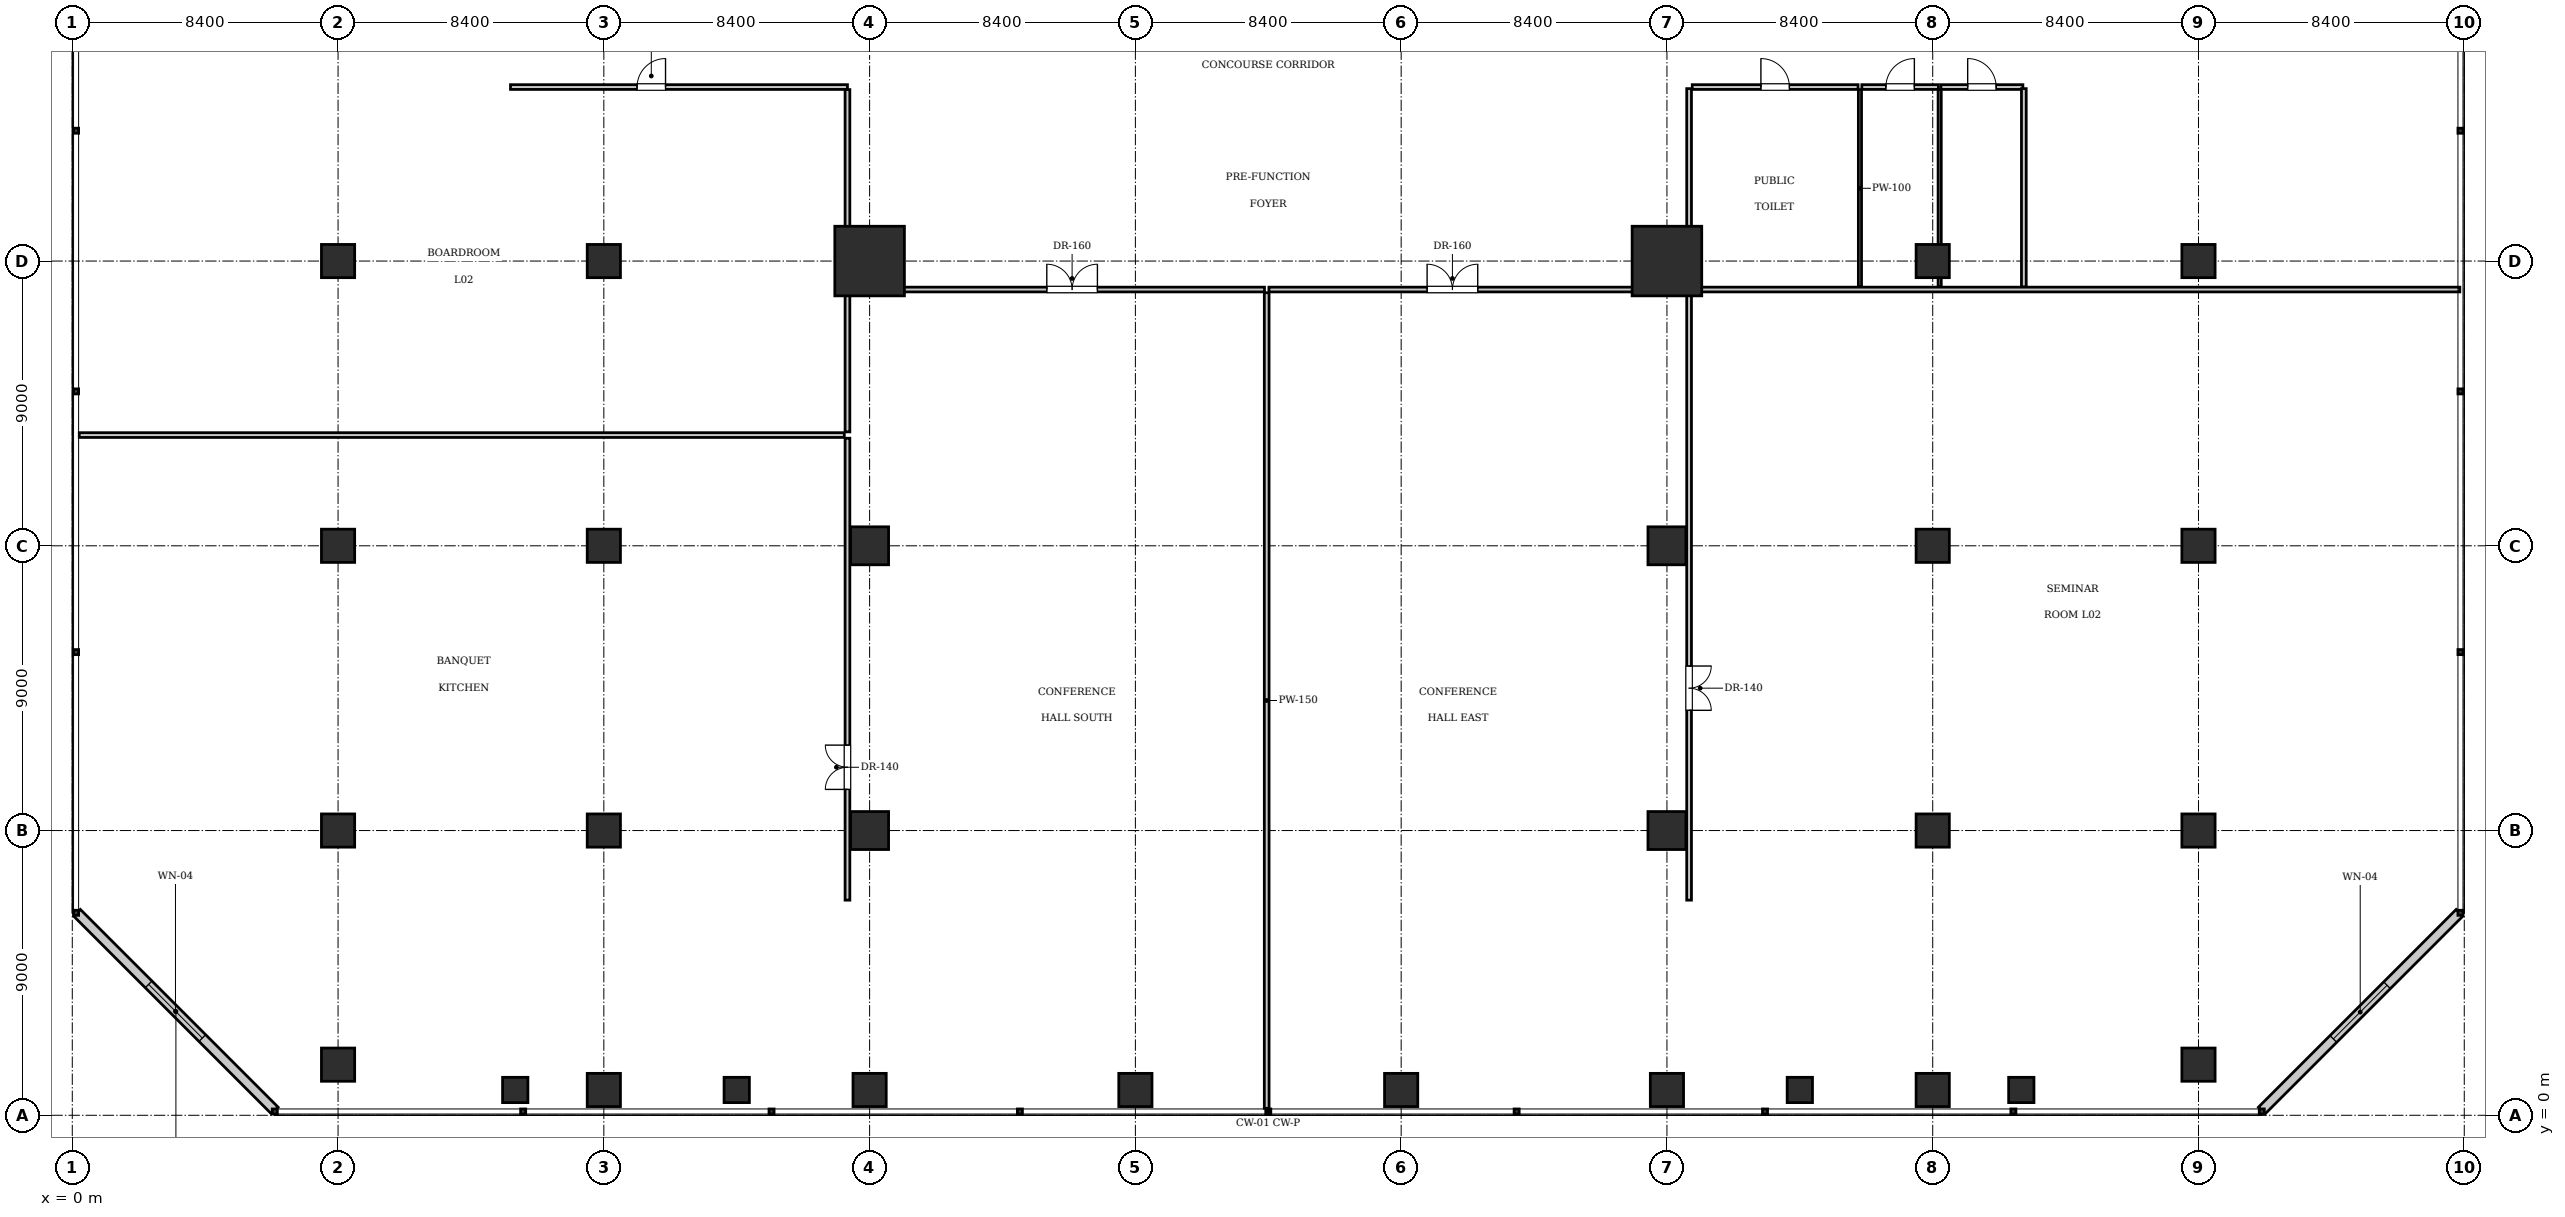
"""IFC4 building model, lengths in metres.
Left out: names, types, materials, properties, quantities, classifications, styles, units other than length and angle.
Written with IfcOpenShell. Run it as: python <this file> out.ifc"""

import sys

from ifc_helpers import new_model, si_unit, direction, frame, frame_2d, origin, origin_2d, place, context, subcontext, project, spatial, rectangle, extrude, element, fill, save


model = new_model("IFC4")
c1 = context("Model", 3, precision=1e-05, world=origin(), true_north=direction((0.0, 1.0)))
c2 = subcontext(c1, "Body", "Model", "MODEL_VIEW")
j1 = project(units=[si_unit("LENGTHUNIT", "METRE"), si_unit("PLANEANGLEUNIT", "RADIAN")], contexts=[c1])
p1 = place(None, origin())
s1 = spatial("IfcSite", under=j1, at=p1, CompositionType="ELEMENT")
p2 = place(p1, origin())
s2 = spatial("IfcBuilding", under=s1, at=p2, CompositionType="ELEMENT")
p3 = place(p2, frame((0.0, 0.0, 10.85)))
s3 = spatial("IfcBuildingStorey", under=s2, at=p3, CompositionType="ELEMENT", Elevation=10.85)
for number, where, z_axis, x_axis in (
    (1, (25.2, 27.0, 0.0), (0.0, 0.0, 1.0), (1.0, 0.0, 0.0)),
    (2, (50.4, 27.0, 0.0), (0.0, 0.0, 1.0), (1.0, 0.0, 0.0)),
):
    element("IfcColumn", number, at=place(p3, frame(where, z_axis=z_axis, x_axis=x_axis)), inside=s3, PredefinedType="COLUMN", context=c2, shape_type="SweptSolid", body=[
        extrude(rectangle(XDim=2.2, YDim=2.2, at=origin_2d()), origin(), (0.0, 0.0, 1.0), 5.6),
    ])
for number, where, z_axis, x_axis in (
    (3, (25.2, 18.0, 0.0), (0.0, 0.0, 1.0), (1.0, 0.0, 0.0)),
    (4, (50.4, 18.0, 0.0), (0.0, 0.0, 1.0), (1.0, 0.0, 0.0)),
    (5, (25.2, 9.0, 0.0), (0.0, 0.0, 1.0), (1.0, 0.0, 0.0)),
    (6, (50.4, 9.0, 0.0), (0.0, 0.0, 1.0), (1.0, 0.0, 0.0)),
):
    element("IfcColumn", number, at=place(p3, frame(where, z_axis=z_axis, x_axis=x_axis)), inside=s3, PredefinedType="COLUMN", context=c2, shape_type="SweptSolid", body=[
        extrude(rectangle(XDim=1.2, YDim=1.2, at=origin_2d()), origin(), (0.0, 0.0, 1.0), 5.6),
    ])
for number, where, z_axis, x_axis in (
    (7, (16.8, 9.0, 0.0), (0.0, 0.0, 1.0), (1.0, 0.0, 0.0)),
    (8, (58.8, 9.0, 0.0), (0.0, 0.0, 1.0), (1.0, 0.0, 0.0)),
    (9, (16.8, 18.0, 0.0), (0.0, 0.0, 1.0), (1.0, 0.0, 0.0)),
    (10, (58.8, 18.0, 0.0), (0.0, 0.0, 1.0), (1.0, 0.0, 0.0)),
    (11, (16.8, 27.0, 0.0), (0.0, 0.0, 1.0), (1.0, 0.0, 0.0)),
    (12, (58.8, 27.0, 0.0), (0.0, 0.0, 1.0), (1.0, 0.0, 0.0)),
    (13, (8.4, 1.6, 0.0), (0.0, 0.0, 1.0), (1.0, 0.0, 0.0)),
    (14, (67.2, 1.6, 0.0), (0.0, 0.0, 1.0), (1.0, 0.0, 0.0)),
    (15, (8.4, 9.0, 0.0), (0.0, 0.0, 1.0), (1.0, 0.0, 0.0)),
    (16, (67.2, 9.0, 0.0), (0.0, 0.0, 1.0), (1.0, 0.0, 0.0)),
    (17, (8.4, 18.0, 0.0), (0.0, 0.0, 1.0), (1.0, 0.0, 0.0)),
    (18, (67.2, 18.0, 0.0), (0.0, 0.0, 1.0), (1.0, 0.0, 0.0)),
    (19, (8.4, 27.0, 0.0), (0.0, 0.0, 1.0), (1.0, 0.0, 0.0)),
    (20, (67.2, 27.0, 0.0), (0.0, 0.0, 1.0), (1.0, 0.0, 0.0)),
    (21, (16.8, 0.8, 0.0), (0.0, 0.0, 1.0), (1.0, 0.0, 0.0)),
    (22, (25.2, 0.8, 0.0), (0.0, 0.0, 1.0), (1.0, 0.0, 0.0)),
    (23, (33.6, 0.8, 0.0), (0.0, 0.0, 1.0), (1.0, 0.0, 0.0)),
    (24, (42.0, 0.8, 0.0), (0.0, 0.0, 1.0), (1.0, 0.0, 0.0)),
    (25, (50.4, 0.8, 0.0), (0.0, 0.0, 1.0), (1.0, 0.0, 0.0)),
    (26, (58.8, 0.8, 0.0), (0.0, 0.0, 1.0), (1.0, 0.0, 0.0)),
):
    element("IfcColumn", number, at=place(p3, frame(where, z_axis=z_axis, x_axis=x_axis)), inside=s3, PredefinedType="COLUMN", context=c2, shape_type="SweptSolid", body=[
        extrude(rectangle(XDim=1.05, YDim=1.05, at=origin_2d()), origin(), (0.0, 0.0, 1.0), 5.6),
    ])
for number, where, z_axis, x_axis in (
    (27, (14.0, 0.8, 0.0), (0.0, 0.0, 1.0), (1.0, 0.0, 0.0)),
    (28, (21.0, 0.8, 0.0), (0.0, 0.0, 1.0), (1.0, 0.0, 0.0)),
    (29, (54.6, 0.8, 0.0), (0.0, 0.0, 1.0), (1.0, 0.0, 0.0)),
    (30, (61.6, 0.8, 0.0), (0.0, 0.0, 1.0), (1.0, 0.0, 0.0)),
):
    element("IfcColumn", number, at=place(p3, frame(where, z_axis=z_axis, x_axis=x_axis)), inside=s3, PredefinedType="PILASTER", context=c2, shape_type="SweptSolid", body=[
        extrude(rectangle(XDim=0.8, YDim=0.8, at=origin_2d()), origin(), (0.0, 0.0, 1.0), 5.6),
    ])
p4 = place(p3, frame((0.15, 6.4, 0.0), z_axis=(0.0, 0.0, 1.0), x_axis=(0.707106781187, -0.707106781187, 0.0)))
e31 = element("IfcWall", 31, at=p4, inside=s3, PredefinedType="SOLIDWALL", context=c2, shape_type="SweptSolid", body=[
    extrude(rectangle(XDim=8.839, YDim=0.3, at=frame_2d((4.419, 0.0))), origin(), (0.0, 0.0, 1.0), 5.32),
])
p5 = place(p4, frame((3.2, 0.0, 0.9)))
e32 = element("IfcOpeningElement", 32, at=p5, cuts=e31, PredefinedType="OPENING", context=c2, shape_type="SweptSolid", body=[
    extrude(rectangle(XDim=2.4, YDim=2.6, at=frame_2d((1.2, 1.3))), frame((0.0, 0.16, 0.0), z_axis=(0.0, -1.0, 0.0), x_axis=(1.0, 0.0, 0.0)), (0.0, 0.0, 1.0), 0.32),
])
p6 = place(p3, frame((69.2, 0.15, 0.0), z_axis=(0.0, 0.0, 1.0), x_axis=(0.707106781187, 0.707106781187, 0.0)))
e33 = element("IfcWall", 33, at=p6, inside=s3, PredefinedType="SOLIDWALL", context=c2, shape_type="SweptSolid", body=[
    extrude(rectangle(XDim=8.839, YDim=0.3, at=frame_2d((4.419, 0.0))), origin(), (0.0, 0.0, 1.0), 5.32),
])
p7 = place(p6, frame((3.2, 0.0, 0.9)))
e34 = element("IfcOpeningElement", 34, at=p7, cuts=e33, PredefinedType="OPENING", context=c2, shape_type="SweptSolid", body=[
    extrude(rectangle(XDim=2.4, YDim=2.6, at=frame_2d((1.2, 1.3))), frame((0.0, 0.16, 0.0), z_axis=(0.0, -1.0, 0.0), x_axis=(1.0, 0.0, 0.0)), (0.0, 0.0, 1.0), 0.32),
])
p8 = place(p3, frame((37.75, 0.22, 0.0), z_axis=(0.0, 0.0, 1.0), x_axis=(0.0, 1.0, 0.0)))
e35 = element("IfcWall", 35, at=p8, inside=s3, PredefinedType="PARTITIONING", context=c2, shape_type="SweptSolid", body=[
    extrude(rectangle(XDim=25.78, YDim=0.15, at=frame_2d((12.89, 0.0))), origin(), (0.0, 0.0, 1.0), 5.32),
])
p9 = place(p3, frame((25.8, 26.1, 0.0), z_axis=(0.0, 0.0, 1.0), x_axis=(1.0, 0.0, 0.0)))
e36 = element("IfcWall", 36, at=p9, inside=s3, PredefinedType="PARTITIONING", context=c2, shape_type="SweptSolid", body=[
    extrude(rectangle(XDim=11.88, YDim=0.15, at=frame_2d((5.94, 0.0))), origin(), (0.0, 0.0, 1.0), 5.32),
])
p10 = place(p9, frame((5.0, 0.0, 0.0)))
e37 = element("IfcOpeningElement", 37, at=p10, cuts=e36, PredefinedType="OPENING", context=c2, shape_type="SweptSolid", body=[
    extrude(rectangle(XDim=1.6, YDim=2.3, at=frame_2d((0.8, 1.15))), frame((0.0, 0.085, 0.0), z_axis=(0.0, -1.0, 0.0), x_axis=(1.0, 0.0, 0.0)), (0.0, 0.0, 1.0), 0.17),
])
p11 = place(p3, frame((37.82, 26.1, 0.0), z_axis=(0.0, 0.0, 1.0), x_axis=(1.0, 0.0, 0.0)))
e38 = element("IfcWall", 38, at=p11, inside=s3, PredefinedType="PARTITIONING", context=c2, shape_type="SweptSolid", body=[
    extrude(rectangle(XDim=11.98, YDim=0.15, at=frame_2d((5.99, 0.0))), origin(), (0.0, 0.0, 1.0), 5.32),
])
p12 = place(p11, frame((5.0, 0.0, 0.0)))
e39 = element("IfcOpeningElement", 39, at=p12, cuts=e38, PredefinedType="OPENING", context=c2, shape_type="SweptSolid", body=[
    extrude(rectangle(XDim=1.6, YDim=2.3, at=frame_2d((0.8, 1.15))), frame((0.0, 0.085, 0.0), z_axis=(0.0, -1.0, 0.0), x_axis=(1.0, 0.0, 0.0)), (0.0, 0.0, 1.0), 0.17),
])
p13 = place(p3, frame((0.22, 21.5, 0.0), z_axis=(0.0, 0.0, 1.0), x_axis=(1.0, 0.0, 0.0)))
e40 = element("IfcWall", 40, at=p13, inside=s3, PredefinedType="PARTITIONING", context=c2, shape_type="SweptSolid", body=[
    extrude(rectangle(XDim=24.18, YDim=0.15, at=frame_2d((12.09, 0.0))), origin(), (0.0, 0.0, 1.0), 5.32),
])
p14 = place(p3, frame((13.85, 32.5, 0.0), z_axis=(0.0, 0.0, 1.0), x_axis=(1.0, 0.0, 0.0)))
e41 = element("IfcWall", 41, at=p14, inside=s3, PredefinedType="PARTITIONING", context=c2, shape_type="SweptSolid", body=[
    extrude(rectangle(XDim=10.65, YDim=0.15, at=frame_2d((5.325, 0.0))), origin(), (0.0, 0.0, 1.0), 5.32),
])
p15 = place(p14, frame((4.0, 0.0, 0.0)))
e42 = element("IfcOpeningElement", 42, at=p15, cuts=e41, PredefinedType="OPENING", context=c2, shape_type="SweptSolid", body=[
    extrude(rectangle(XDim=0.9, YDim=2.1, at=frame_2d((0.45, 1.05))), frame((0.0, 0.085, 0.0), z_axis=(0.0, -1.0, 0.0), x_axis=(1.0, 0.0, 0.0)), (0.0, 0.0, 1.0), 0.17),
])
p16 = place(p3, frame((24.5, 6.8, 0.0), z_axis=(0.0, 0.0, 1.0), x_axis=(0.0, 1.0, 0.0)))
e43 = element("IfcWall", 43, at=p16, inside=s3, PredefinedType="PARTITIONING", context=c2, shape_type="SweptSolid", body=[
    extrude(rectangle(XDim=14.6, YDim=0.15, at=frame_2d((7.3, 0.0))), origin(), (0.0, 0.0, 1.0), 5.32),
])
p17 = place(p16, frame((3.5, 0.0, 0.0)))
e44 = element("IfcOpeningElement", 44, at=p17, cuts=e43, PredefinedType="OPENING", context=c2, shape_type="SweptSolid", body=[
    extrude(rectangle(XDim=1.4, YDim=2.2, at=frame_2d((0.7, 1.1))), frame((0.0, 0.085, 0.0), z_axis=(0.0, -1.0, 0.0), x_axis=(1.0, 0.0, 0.0)), (0.0, 0.0, 1.0), 0.17),
])
p18 = place(p3, frame((24.5, 21.6, 0.0), z_axis=(0.0, 0.0, 1.0), x_axis=(0.0, 1.0, 0.0)))
e45 = element("IfcWall", 45, at=p18, inside=s3, PredefinedType="PARTITIONING", context=c2, shape_type="SweptSolid", body=[
    extrude(rectangle(XDim=10.82, YDim=0.15, at=frame_2d((5.41, 0.0))), origin(), (0.0, 0.0, 1.0), 5.32),
])
p19 = place(p3, frame((51.2, 32.5, 0.0), z_axis=(0.0, 0.0, 1.0), x_axis=(1.0, 0.0, 0.0)))
e46 = element("IfcWall", 46, at=p19, inside=s3, PredefinedType="PARTITIONING", context=c2, shape_type="SweptSolid", body=[
    extrude(rectangle(XDim=5.24, YDim=0.15, at=frame_2d((2.62, 0.0))), origin(), (0.0, 0.0, 1.0), 5.32),
])
p20 = place(p19, frame((2.17, 0.0, 0.0)))
e47 = element("IfcOpeningElement", 47, at=p20, cuts=e46, PredefinedType="OPENING", context=c2, shape_type="SweptSolid", body=[
    extrude(rectangle(XDim=0.9, YDim=2.1, at=frame_2d((0.45, 1.05))), frame((0.0, 0.085, 0.0), z_axis=(0.0, -1.0, 0.0), x_axis=(1.0, 0.0, 0.0)), (0.0, 0.0, 1.0), 0.17),
])
p21 = place(p3, frame((56.56, 32.5, 0.0), z_axis=(0.0, 0.0, 1.0), x_axis=(1.0, 0.0, 0.0)))
e48 = element("IfcWall", 48, at=p21, inside=s3, PredefinedType="PARTITIONING", context=c2, shape_type="SweptSolid", body=[
    extrude(rectangle(XDim=2.42, YDim=0.15, at=frame_2d((1.21, 0.0))), origin(), (0.0, 0.0, 1.0), 5.32),
])
p22 = place(p21, frame((0.76, 0.0, 0.0)))
e49 = element("IfcOpeningElement", 49, at=p22, cuts=e48, PredefinedType="OPENING", context=c2, shape_type="SweptSolid", body=[
    extrude(rectangle(XDim=0.9, YDim=2.1, at=frame_2d((0.45, 1.05))), frame((0.0, 0.085, 0.0), z_axis=(0.0, -1.0, 0.0), x_axis=(1.0, 0.0, 0.0)), (0.0, 0.0, 1.0), 0.17),
])
p23 = place(p3, frame((59.06, 32.5, 0.0), z_axis=(0.0, 0.0, 1.0), x_axis=(1.0, 0.0, 0.0)))
e50 = element("IfcWall", 50, at=p23, inside=s3, PredefinedType="PARTITIONING", context=c2, shape_type="SweptSolid", body=[
    extrude(rectangle(XDim=2.59, YDim=0.15, at=frame_2d((1.295, 0.0))), origin(), (0.0, 0.0, 1.0), 5.32),
])
p24 = place(p23, frame((0.845, 0.0, 0.0)))
e51 = element("IfcOpeningElement", 51, at=p24, cuts=e50, PredefinedType="OPENING", context=c2, shape_type="SweptSolid", body=[
    extrude(rectangle(XDim=0.9, YDim=2.1, at=frame_2d((0.45, 1.05))), frame((0.0, 0.085, 0.0), z_axis=(0.0, -1.0, 0.0), x_axis=(1.0, 0.0, 0.0)), (0.0, 0.0, 1.0), 0.17),
])
for number, where, z_axis, x_axis in (
    (52, (51.1, 26.18, 0.0), (0.0, 0.0, 1.0), (0.0, 1.0, 0.0)),
    (53, (61.68, 26.18, 0.0), (0.0, 0.0, 1.0), (0.0, 1.0, 0.0)),
):
    element("IfcWall", number, at=place(p3, frame(where, z_axis=z_axis, x_axis=x_axis)), inside=s3, PredefinedType="PARTITIONING", context=c2, shape_type="SweptSolid", body=[
        extrude(rectangle(XDim=6.27, YDim=0.15, at=frame_2d((3.135, 0.0))), origin(), (0.0, 0.0, 1.0), 5.32),
    ])
for number, where, z_axis, x_axis in (
    (54, (56.5, 26.18, 0.0), (0.0, 0.0, 1.0), (0.0, 1.0, 0.0)),
    (55, (59.02, 26.18, 0.0), (0.0, 0.0, 1.0), (0.0, 1.0, 0.0)),
):
    element("IfcWall", number, at=place(p3, frame(where, z_axis=z_axis, x_axis=x_axis)), inside=s3, PredefinedType="PARTITIONING", context=c2, shape_type="SweptSolid", body=[
        extrude(rectangle(XDim=6.24, YDim=0.1, at=frame_2d((3.12, 0.0))), origin(), (0.0, 0.0, 1.0), 5.32),
    ])
p25 = place(p3, frame((51.1, 6.8, 0.0), z_axis=(0.0, 0.0, 1.0), x_axis=(0.0, 1.0, 0.0)))
e56 = element("IfcWall", 56, at=p25, inside=s3, PredefinedType="PARTITIONING", context=c2, shape_type="SweptSolid", body=[
    extrude(rectangle(XDim=19.2, YDim=0.15, at=frame_2d((9.6, 0.0))), origin(), (0.0, 0.0, 1.0), 5.32),
])
p26 = place(p25, frame((6.0, 0.0, 0.0)))
e57 = element("IfcOpeningElement", 57, at=p26, cuts=e56, PredefinedType="OPENING", context=c2, shape_type="SweptSolid", body=[
    extrude(rectangle(XDim=1.4, YDim=2.2, at=frame_2d((0.7, 1.1))), frame((0.0, 0.085, 0.0), z_axis=(0.0, -1.0, 0.0), x_axis=(1.0, 0.0, 0.0)), (0.0, 0.0, 1.0), 0.17),
])
p27 = place(p3, frame((51.12, 26.1, 0.0), z_axis=(0.0, 0.0, 1.0), x_axis=(1.0, 0.0, 0.0)))
e58 = element("IfcWall", 58, at=p27, inside=s3, PredefinedType="PARTITIONING", context=c2, shape_type="SweptSolid", body=[
    extrude(rectangle(XDim=24.34, YDim=0.15, at=frame_2d((12.17, 0.0))), origin(), (0.0, 0.0, 1.0), 5.32),
])
p28 = place(p5, origin())
e59 = element("IfcWindow", 59, at=p28, inside=s3, PartitioningType="SINGLE_PANEL", PredefinedType="WINDOW", context=c2, shape_type="SweptSolid", body=[
    extrude(rectangle(XDim=2.4, YDim=2.6, at=frame_2d((1.2, 1.3))), frame((0.0, 0.03, 0.0), z_axis=(0.0, -1.0, 0.0), x_axis=(1.0, 0.0, 0.0)), (0.0, 0.0, 1.0), 0.06),
])
fill(e32, e59)
p29 = place(p7, origin())
e60 = element("IfcWindow", 60, at=p29, inside=s3, PartitioningType="SINGLE_PANEL", PredefinedType="WINDOW", context=c2, shape_type="SweptSolid", body=[
    extrude(rectangle(XDim=2.4, YDim=2.6, at=frame_2d((1.2, 1.3))), frame((0.0, 0.03, 0.0), z_axis=(0.0, -1.0, 0.0), x_axis=(1.0, 0.0, 0.0)), (0.0, 0.0, 1.0), 0.06),
])
fill(e34, e60)
p30 = place(p10, origin())
e61 = element("IfcDoor", 61, at=p30, inside=s3, OperationType="DOUBLE_DOOR_SINGLE_SWING", PredefinedType="DOOR", context=c2, shape_type="SweptSolid", body=[
    extrude(rectangle(XDim=1.6, YDim=2.3, at=frame_2d((0.8, 1.15))), frame((0.0, 0.025, 0.0), z_axis=(0.0, -1.0, 0.0), x_axis=(1.0, 0.0, 0.0)), (0.0, 0.0, 1.0), 0.05),
])
fill(e37, e61)
p31 = place(p12, origin())
e62 = element("IfcDoor", 62, at=p31, inside=s3, OperationType="DOUBLE_DOOR_SINGLE_SWING", PredefinedType="DOOR", context=c2, shape_type="SweptSolid", body=[
    extrude(rectangle(XDim=1.6, YDim=2.3, at=frame_2d((0.8, 1.15))), frame((0.0, 0.025, 0.0), z_axis=(0.0, -1.0, 0.0), x_axis=(1.0, 0.0, 0.0)), (0.0, 0.0, 1.0), 0.05),
])
fill(e39, e62)
p32 = place(p15, origin())
e63 = element("IfcDoor", 63, at=p32, inside=s3, OperationType="SINGLE_SWING_RIGHT", PredefinedType="DOOR", context=c2, shape_type="SweptSolid", body=[
    extrude(rectangle(XDim=0.9, YDim=2.1, at=frame_2d((0.45, 1.05))), frame((0.0, 0.025, 0.0), z_axis=(0.0, -1.0, 0.0), x_axis=(1.0, 0.0, 0.0)), (0.0, 0.0, 1.0), 0.05),
])
fill(e42, e63)
p33 = place(p17, origin())
e64 = element("IfcDoor", 64, at=p33, inside=s3, OperationType="DOUBLE_DOOR_SINGLE_SWING", PredefinedType="DOOR", context=c2, shape_type="SweptSolid", body=[
    extrude(rectangle(XDim=1.4, YDim=2.2, at=frame_2d((0.7, 1.1))), frame((0.0, 0.025, 0.0), z_axis=(0.0, -1.0, 0.0), x_axis=(1.0, 0.0, 0.0)), (0.0, 0.0, 1.0), 0.05),
])
fill(e44, e64)
p34 = place(p20, origin())
e65 = element("IfcDoor", 65, at=p34, inside=s3, OperationType="SINGLE_SWING_LEFT", PredefinedType="DOOR", context=c2, shape_type="SweptSolid", body=[
    extrude(rectangle(XDim=0.9, YDim=2.1, at=frame_2d((0.45, 1.05))), frame((0.0, 0.025, 0.0), z_axis=(0.0, -1.0, 0.0), x_axis=(1.0, 0.0, 0.0)), (0.0, 0.0, 1.0), 0.05),
])
fill(e47, e65)
p35 = place(p22, origin())
e66 = element("IfcDoor", 66, at=p35, inside=s3, OperationType="SINGLE_SWING_RIGHT", PredefinedType="DOOR", context=c2, shape_type="SweptSolid", body=[
    extrude(rectangle(XDim=0.9, YDim=2.1, at=frame_2d((0.45, 1.05))), frame((0.0, 0.025, 0.0), z_axis=(0.0, -1.0, 0.0), x_axis=(1.0, 0.0, 0.0)), (0.0, 0.0, 1.0), 0.05),
])
fill(e49, e66)
p36 = place(p24, origin())
e67 = element("IfcDoor", 67, at=p36, inside=s3, OperationType="SINGLE_SWING_LEFT", PredefinedType="DOOR", context=c2, shape_type="SweptSolid", body=[
    extrude(rectangle(XDim=0.9, YDim=2.1, at=frame_2d((0.45, 1.05))), frame((0.0, 0.025, 0.0), z_axis=(0.0, -1.0, 0.0), x_axis=(1.0, 0.0, 0.0)), (0.0, 0.0, 1.0), 0.05),
])
fill(e51, e67)
p37 = place(p26, frame((1.4, 0.0, 0.0), z_axis=(0.0, 0.0, 1.0), x_axis=(-1.0, 0.0, 0.0)))
e68 = element("IfcDoor", 68, at=p37, inside=s3, OperationType="DOUBLE_DOOR_SINGLE_SWING", PredefinedType="DOOR", context=c2, shape_type="SweptSolid", body=[
    extrude(rectangle(XDim=1.4, YDim=2.2, at=frame_2d((0.7, 1.1))), frame((0.0, 0.025, 0.0), z_axis=(0.0, -1.0, 0.0), x_axis=(1.0, 0.0, 0.0)), (0.0, 0.0, 1.0), 0.05),
])
fill(e57, e68)
save(model, sys.argv[1])
